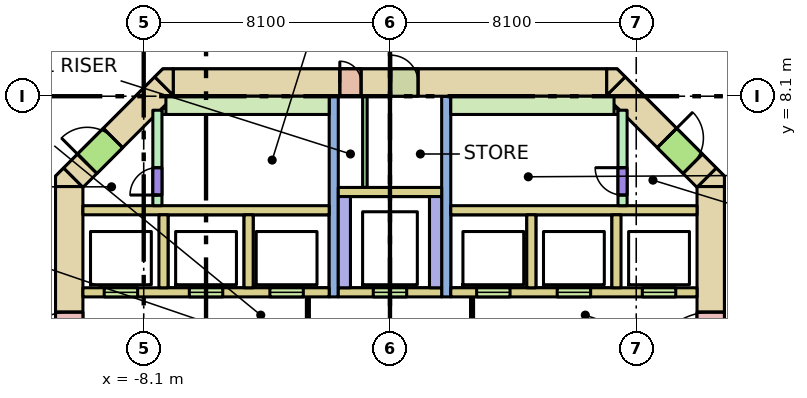
"""IFC4 building model, lengths in metres.
Left out: names, types, materials, properties, quantities, classifications, styles, units other than length and angle.
Written with IfcOpenShell. Run it as: python <this file> out.ifc"""

import sys

from ifc_helpers import new_model, si_unit, direction, frame, frame_2d, origin, place, context, subcontext, project, spatial, polyline, rectangle, outline, extrude, element, fill, save


model = new_model("IFC4")
c1 = context("Model", 3, precision=1e-05, world=origin(), true_north=direction((0.0, 1.0)))
c2 = subcontext(c1, "Body", "Model", "MODEL_VIEW")
j1 = project(units=[si_unit("LENGTHUNIT", "METRE"), si_unit("PLANEANGLEUNIT", "RADIAN")], contexts=[c1])
p1 = place(None, origin())
s1 = spatial("IfcSite", under=j1, at=p1, CompositionType="ELEMENT")
p2 = place(p1, origin())
s2 = spatial("IfcBuilding", under=s1, at=p2, CompositionType="ELEMENT")
p3 = place(p2, frame((0.0, 0.0, -3.6)))
s3 = spatial("IfcBuildingStorey", under=s2, at=p3, CompositionType="ELEMENT", Elevation=-3.6)
p4 = place(p3, frame((-7.13, 8.55, -0.32), z_axis=(0.0, 0.0, 1.0), x_axis=(1.0, 0.0, 0.0)))
e1 = element("IfcWall", 1, at=p4, inside=s3, PredefinedType="SHEAR", context=c2, shape_type="SweptSolid", body=[
    extrude(rectangle(XDim=14.26, YDim=0.9, at=frame_2d((7.13, 0.0))), origin(), (0.0, 0.0, 1.0), 3.6),
])
p5 = place(p4, frame((5.48, 0.0, 0.32)))
e2 = element("IfcOpeningElement", 2, at=p5, cuts=e1, PredefinedType="OPENING", context=c2, shape_type="SweptSolid", body=[
    extrude(rectangle(XDim=0.7, YDim=2.1, at=frame_2d((0.35, 1.05))), frame((0.0, 0.46, 0.0), z_axis=(0.0, -1.0, 0.0), x_axis=(1.0, 0.0, 0.0)), (0.0, 0.0, 1.0), 0.92),
])
p6 = place(p4, frame((7.155, 0.0, 0.32)))
e3 = element("IfcOpeningElement", 3, at=p6, cuts=e1, PredefinedType="OPENING", context=c2, shape_type="SweptSolid", body=[
    extrude(rectangle(XDim=0.9, YDim=2.1, at=frame_2d((0.45, 1.05))), frame((0.0, 0.46, 0.0), z_axis=(0.0, -1.0, 0.0), x_axis=(1.0, 0.0, 0.0)), (0.0, 0.0, 1.0), 0.92),
])
p7 = place(p3, frame((-10.55, -5.13, -0.32), z_axis=(0.0, 0.0, 1.0), x_axis=(0.0, 1.0, 0.0)))
e4 = element("IfcWall", 4, at=p7, inside=s3, PredefinedType="SHEAR", context=c2, shape_type="SweptSolid", body=[
    extrude(rectangle(XDim=10.26, YDim=0.9, at=frame_2d((5.13, 0.0))), origin(), (0.0, 0.0, 1.0), 3.6),
])
p8 = place(p7, frame((4.13, 0.0, 0.32)))
e5 = element("IfcOpeningElement", 5, at=p8, cuts=e4, PredefinedType="OPENING", context=c2, shape_type="SweptSolid", body=[
    extrude(rectangle(XDim=2.0, YDim=2.1, at=frame_2d((1.0, 1.05))), frame((0.0, 0.46, 0.0), z_axis=(0.0, -1.0, 0.0), x_axis=(1.0, 0.0, 0.0)), (0.0, 0.0, 1.0), 0.92),
])
p9 = place(p3, frame((10.55, -5.13, -0.32), z_axis=(0.0, 0.0, 1.0), x_axis=(0.0, 1.0, 0.0)))
e6 = element("IfcWall", 6, at=p9, inside=s3, PredefinedType="SHEAR", context=c2, shape_type="SweptSolid", body=[
    extrude(rectangle(XDim=10.26, YDim=0.9, at=frame_2d((5.13, 0.0))), origin(), (0.0, 0.0, 1.0), 3.6),
])
p10 = place(p9, frame((4.13, 0.0, 0.32)))
e7 = element("IfcOpeningElement", 7, at=p10, cuts=e6, PredefinedType="OPENING", context=c2, shape_type="SweptSolid", body=[
    extrude(rectangle(XDim=2.0, YDim=2.1, at=frame_2d((1.0, 1.05))), frame((0.0, 0.46, 0.0), z_axis=(0.0, -1.0, 0.0), x_axis=(1.0, 0.0, 0.0)), (0.0, 0.0, 1.0), 0.92),
])
p11 = place(p3, frame((-10.418, 5.418, -0.32), z_axis=(0.0, 0.0, 1.0), x_axis=(0.707106781187, 0.707106781187, 0.0)))
e8 = element("IfcWall", 8, at=p11, inside=s3, PredefinedType="SHEAR", context=c2, shape_type="SweptSolid", body=[
    extrude(rectangle(XDim=4.243, YDim=0.9, at=frame_2d((2.121, 0.0))), origin(), (0.0, 0.0, 1.0), 3.6),
])
p12 = place(p11, frame((0.65, 0.0, 0.32)))
e9 = element("IfcOpeningElement", 9, at=p12, cuts=e8, PredefinedType="OPENING", context=c2, shape_type="SweptSolid", body=[
    extrude(rectangle(XDim=1.2, YDim=2.1, at=frame_2d((0.6, 1.05))), frame((0.0, 0.46, 0.0), z_axis=(0.0, -1.0, 0.0), x_axis=(1.0, 0.0, 0.0)), (0.0, 0.0, 1.0), 0.92),
])
p13 = place(p3, frame((7.418, 8.418, -0.32), z_axis=(0.0, 0.0, 1.0), x_axis=(0.707106781187, -0.707106781187, 0.0)))
e10 = element("IfcWall", 10, at=p13, inside=s3, PredefinedType="SHEAR", context=c2, shape_type="SweptSolid", body=[
    extrude(rectangle(XDim=4.243, YDim=0.9, at=frame_2d((2.121, 0.0))), origin(), (0.0, 0.0, 1.0), 3.6),
])
p14 = place(p13, frame((2.393, 0.0, 0.32)))
e11 = element("IfcOpeningElement", 11, at=p14, cuts=e10, PredefinedType="OPENING", context=c2, shape_type="SweptSolid", body=[
    extrude(rectangle(XDim=1.2, YDim=2.1, at=frame_2d((0.6, 1.05))), frame((0.0, 0.46, 0.0), z_axis=(0.0, -1.0, 0.0), x_axis=(1.0, 0.0, 0.0)), (0.0, 0.0, 1.0), 0.92),
])
p15 = place(p3, frame((0.0, 0.0, -0.32)))
e12 = element("IfcWall", 12, at=p15, inside=s3, PredefinedType="SHEAR", context=c2, shape_type="SweptSolid", body=[
    extrude(outline(polyline([(-10.736, 5.736), (-10.13, 5.13), (-11.0, 5.13), (-11.0, 5.473), (-10.736, 5.736)])), origin(), (0.0, 0.0, 1.0), 3.6),
])
p16 = place(p3, frame((0.0, 0.0, -0.32)))
e13 = element("IfcWall", 13, at=p16, inside=s3, PredefinedType="SHEAR", context=c2, shape_type="SweptSolid", body=[
    extrude(outline(polyline([(11.0, 5.473), (11.0, 5.13), (10.13, 5.13), (10.736, 5.736), (11.0, 5.473)])), origin(), (0.0, 0.0, 1.0), 3.6),
])
p17 = place(p3, frame((0.0, 0.0, -0.32)))
e14 = element("IfcWall", 14, at=p17, inside=s3, PredefinedType="SHEAR", context=c2, shape_type="SweptSolid", body=[
    extrude(outline(polyline([(-7.473, 9.0), (-7.13, 9.0), (-7.13, 8.13), (-7.736, 8.736), (-7.473, 9.0)])), origin(), (0.0, 0.0, 1.0), 3.6),
])
p18 = place(p3, frame((0.0, 0.0, -0.32)))
e15 = element("IfcWall", 15, at=p18, inside=s3, PredefinedType="SHEAR", context=c2, shape_type="SweptSolid", body=[
    extrude(outline(polyline([(7.473, 9.0), (7.736, 8.736), (7.13, 8.13), (7.13, 9.0), (7.473, 9.0)])), origin(), (0.0, 0.0, 1.0), 3.6),
])
for number, where, z_axis, x_axis in (
    (16, (-10.1, 4.35, 0.0), (0.0, 0.0, 1.0), (1.0, 0.0, 0.0)),
    (17, (2.0, 4.35, 0.0), (0.0, 0.0, 1.0), (1.0, 0.0, 0.0)),
):
    element("IfcWall", number, at=place(p3, frame(where, z_axis=z_axis, x_axis=x_axis)), inside=s3, PredefinedType="SOLIDWALL", context=c2, shape_type="SweptSolid", body=[
        extrude(rectangle(XDim=8.1, YDim=0.3, at=frame_2d((4.05, 0.0))), origin(), (0.0, 0.0, 1.0), 3.28),
    ])
p19 = place(p3, frame((-10.1, 1.65, 0.0), z_axis=(0.0, 0.0, 1.0), x_axis=(1.0, 0.0, 0.0)))
e18 = element("IfcWall", 18, at=p19, inside=s3, PredefinedType="SOLIDWALL", context=c2, shape_type="SweptSolid", body=[
    extrude(rectangle(XDim=8.1, YDim=0.3, at=frame_2d((4.05, 0.0))), origin(), (0.0, 0.0, 1.0), 3.28),
])
p20 = place(p19, frame((0.7, 0.0, 0.0)))
e19 = element("IfcOpeningElement", 19, at=p20, cuts=e18, PredefinedType="OPENING", context=c2, shape_type="SweptSolid", body=[
    extrude(rectangle(XDim=1.1, YDim=2.1, at=frame_2d((0.55, 1.05))), frame((0.0, 0.16, 0.0), z_axis=(0.0, -1.0, 0.0), x_axis=(1.0, 0.0, 0.0)), (0.0, 0.0, 1.0), 0.32),
])
p21 = place(p19, frame((3.5, 0.0, 0.0)))
e20 = element("IfcOpeningElement", 20, at=p21, cuts=e18, PredefinedType="OPENING", context=c2, shape_type="SweptSolid", body=[
    extrude(rectangle(XDim=1.1, YDim=2.1, at=frame_2d((0.55, 1.05))), frame((0.0, 0.16, 0.0), z_axis=(0.0, -1.0, 0.0), x_axis=(1.0, 0.0, 0.0)), (0.0, 0.0, 1.0), 0.32),
])
p22 = place(p19, frame((6.15, 0.0, 0.0)))
e21 = element("IfcOpeningElement", 21, at=p22, cuts=e18, PredefinedType="OPENING", context=c2, shape_type="SweptSolid", body=[
    extrude(rectangle(XDim=1.1, YDim=2.1, at=frame_2d((0.55, 1.05))), frame((0.0, 0.16, 0.0), z_axis=(0.0, -1.0, 0.0), x_axis=(1.0, 0.0, 0.0)), (0.0, 0.0, 1.0), 0.32),
])
p23 = place(p3, frame((2.0, 1.65, 0.0), z_axis=(0.0, 0.0, 1.0), x_axis=(1.0, 0.0, 0.0)))
e22 = element("IfcWall", 22, at=p23, inside=s3, PredefinedType="SOLIDWALL", context=c2, shape_type="SweptSolid", body=[
    extrude(rectangle(XDim=8.1, YDim=0.3, at=frame_2d((4.05, 0.0))), origin(), (0.0, 0.0, 1.0), 3.28),
])
p24 = place(p23, frame((0.85, 0.0, 0.0)))
e23 = element("IfcOpeningElement", 23, at=p24, cuts=e22, PredefinedType="OPENING", context=c2, shape_type="SweptSolid", body=[
    extrude(rectangle(XDim=1.1, YDim=2.1, at=frame_2d((0.55, 1.05))), frame((0.0, 0.16, 0.0), z_axis=(0.0, -1.0, 0.0), x_axis=(1.0, 0.0, 0.0)), (0.0, 0.0, 1.0), 0.32),
])
p25 = place(p23, frame((3.5, 0.0, 0.0)))
e24 = element("IfcOpeningElement", 24, at=p25, cuts=e22, PredefinedType="OPENING", context=c2, shape_type="SweptSolid", body=[
    extrude(rectangle(XDim=1.1, YDim=2.1, at=frame_2d((0.55, 1.05))), frame((0.0, 0.16, 0.0), z_axis=(0.0, -1.0, 0.0), x_axis=(1.0, 0.0, 0.0)), (0.0, 0.0, 1.0), 0.32),
])
p26 = place(p23, frame((6.3, 0.0, 0.0)))
e25 = element("IfcOpeningElement", 25, at=p26, cuts=e22, PredefinedType="OPENING", context=c2, shape_type="SweptSolid", body=[
    extrude(rectangle(XDim=1.1, YDim=2.1, at=frame_2d((0.55, 1.05))), frame((0.0, 0.16, 0.0), z_axis=(0.0, -1.0, 0.0), x_axis=(1.0, 0.0, 0.0)), (0.0, 0.0, 1.0), 0.32),
])
for number, where, z_axis, x_axis in (
    (26, (-7.45, 1.8, 0.0), (0.0, 0.0, 1.0), (0.0, 1.0, 0.0)),
    (27, (-4.65, 1.8, 0.0), (0.0, 0.0, 1.0), (0.0, 1.0, 0.0)),
    (28, (4.65, 1.8, 0.0), (0.0, 0.0, 1.0), (0.0, 1.0, 0.0)),
    (29, (7.45, 1.8, 0.0), (0.0, 0.0, 1.0), (0.0, 1.0, 0.0)),
):
    element("IfcWall", number, at=place(p3, frame(where, z_axis=z_axis, x_axis=x_axis)), inside=s3, PredefinedType="SOLIDWALL", context=c2, shape_type="SweptSolid", body=[
        extrude(rectangle(XDim=2.4, YDim=0.3, at=frame_2d((1.2, 0.0))), origin(), (0.0, 0.0, 1.0), 3.28),
    ])
for number, where, z_axis, x_axis in (
    (30, (-1.85, 1.5, 0.0), (0.0, 0.0, 1.0), (0.0, 1.0, 0.0)),
    (31, (1.85, 1.5, 0.0), (0.0, 0.0, 1.0), (0.0, 1.0, 0.0)),
):
    element("IfcWall", number, at=place(p3, frame(where, z_axis=z_axis, x_axis=x_axis)), inside=s3, PredefinedType="SHEAR", context=c2, shape_type="SweptSolid", body=[
        extrude(rectangle(XDim=6.6, YDim=0.3, at=frame_2d((3.3, 0.0))), origin(), (0.0, 0.0, 1.0), 3.28),
    ])
p27 = place(p3, frame((-1.7, 1.65, 0.0), z_axis=(0.0, 0.0, 1.0), x_axis=(1.0, 0.0, 0.0)))
e32 = element("IfcWall", 32, at=p27, inside=s3, PredefinedType="SOLIDWALL", context=c2, shape_type="SweptSolid", body=[
    extrude(rectangle(XDim=3.4, YDim=0.3, at=frame_2d((1.7, 0.0))), origin(), (0.0, 0.0, 1.0), 3.28),
])
p28 = place(p27, frame((1.15, 0.0, 0.0)))
e33 = element("IfcOpeningElement", 33, at=p28, cuts=e32, PredefinedType="OPENING", context=c2, shape_type="SweptSolid", body=[
    extrude(rectangle(XDim=1.1, YDim=2.1, at=frame_2d((0.55, 1.05))), frame((0.0, 0.16, 0.0), z_axis=(0.0, -1.0, 0.0), x_axis=(1.0, 0.0, 0.0)), (0.0, 0.0, 1.0), 0.32),
])
for number, where, z_axis, x_axis in (
    (34, (-1.5, 1.8, 0.0), (0.0, 0.0, 1.0), (0.0, 1.0, 0.0)),
    (35, (1.5, 1.8, 0.0), (0.0, 0.0, 1.0), (0.0, 1.0, 0.0)),
):
    element("IfcWall", number, at=place(p3, frame(where, z_axis=z_axis, x_axis=x_axis)), inside=s3, PredefinedType="SOLIDWALL", context=c2, shape_type="SweptSolid", body=[
        extrude(rectangle(XDim=3.0, YDim=0.4, at=frame_2d((1.5, 0.0))), origin(), (0.0, 0.0, 1.0), 3.28),
    ])
p29 = place(p3, frame((-1.7, 4.95, 0.0), z_axis=(0.0, 0.0, 1.0), x_axis=(1.0, 0.0, 0.0)))
e36 = element("IfcWall", 36, at=p29, inside=s3, PredefinedType="SOLIDWALL", context=c2, shape_type="SweptSolid", body=[
    extrude(rectangle(XDim=3.4, YDim=0.3, at=frame_2d((1.7, 0.0))), origin(), (0.0, 0.0, 1.0), 3.28),
])
p30 = place(p3, frame((-7.65, 4.5, 0.0), z_axis=(0.0, 0.0, 1.0), x_axis=(0.0, 1.0, 0.0)))
e37 = element("IfcWall", 37, at=p30, inside=s3, PredefinedType="SHEAR", context=c2, shape_type="SweptSolid", body=[
    extrude(rectangle(XDim=3.14, YDim=0.3, at=frame_2d((1.57, 0.0))), origin(), (0.0, 0.0, 1.0), 3.28),
])
p31 = place(p30, frame((0.35, 0.0, 0.0)))
e38 = element("IfcOpeningElement", 38, at=p31, cuts=e37, PredefinedType="OPENING", context=c2, shape_type="SweptSolid", body=[
    extrude(rectangle(XDim=0.9, YDim=2.1, at=frame_2d((0.45, 1.05))), frame((0.0, 0.16, 0.0), z_axis=(0.0, -1.0, 0.0), x_axis=(1.0, 0.0, 0.0)), (0.0, 0.0, 1.0), 0.32),
])
p32 = place(p3, frame((-7.37, 7.8, 0.0), z_axis=(0.0, 0.0, 1.0), x_axis=(1.0, 0.0, 0.0)))
e39 = element("IfcWall", 39, at=p32, inside=s3, PredefinedType="SHEAR", context=c2, shape_type="SweptSolid", body=[
    extrude(rectangle(XDim=5.37, YDim=0.6, at=frame_2d((2.685, 0.0))), origin(), (0.0, 0.0, 1.0), 3.28),
])
p33 = place(p3, frame((7.65, 4.5, 0.0), z_axis=(0.0, 0.0, 1.0), x_axis=(0.0, 1.0, 0.0)))
e40 = element("IfcWall", 40, at=p33, inside=s3, PredefinedType="SHEAR", context=c2, shape_type="SweptSolid", body=[
    extrude(rectangle(XDim=3.14, YDim=0.3, at=frame_2d((1.57, 0.0))), origin(), (0.0, 0.0, 1.0), 3.28),
])
p34 = place(p33, frame((0.35, 0.0, 0.0)))
e41 = element("IfcOpeningElement", 41, at=p34, cuts=e40, PredefinedType="OPENING", context=c2, shape_type="SweptSolid", body=[
    extrude(rectangle(XDim=0.9, YDim=2.1, at=frame_2d((0.45, 1.05))), frame((0.0, 0.16, 0.0), z_axis=(0.0, -1.0, 0.0), x_axis=(1.0, 0.0, 0.0)), (0.0, 0.0, 1.0), 0.32),
])
p35 = place(p3, frame((2.0, 7.8, 0.0), z_axis=(0.0, 0.0, 1.0), x_axis=(1.0, 0.0, 0.0)))
e42 = element("IfcWall", 42, at=p35, inside=s3, PredefinedType="SHEAR", context=c2, shape_type="SweptSolid", body=[
    extrude(rectangle(XDim=5.37, YDim=0.6, at=frame_2d((2.685, 0.0))), origin(), (0.0, 0.0, 1.0), 3.28),
])
for number, where, z_axis, x_axis in (
    (43, (-7.5, 7.6, 0.0), (0.0, 0.0, 1.0), (1.0, 0.0, 0.0)),
    (44, (6.9, 7.6, 0.0), (0.0, 0.0, 1.0), (1.0, 0.0, 0.0)),
):
    element("IfcWall", number, at=place(p3, frame(where, z_axis=z_axis, x_axis=x_axis)), inside=s3, PredefinedType="SHEAR", context=c2, shape_type="SweptSolid", body=[
        extrude(rectangle(XDim=0.6, YDim=0.2, at=frame_2d((0.3, 0.0))), origin(), (0.0, 0.0, 1.0), 3.28),
    ])
p36 = place(p3, frame((-2.7, -1.5, 0.0), z_axis=(0.0, 0.0, 1.0), x_axis=(0.0, 1.0, 0.0)))
e45 = element("IfcWall", 45, at=p36, inside=s3, PredefinedType="PARTITIONING", context=c2, shape_type="SweptSolid", body=[
    extrude(rectangle(XDim=3.0, YDim=0.1, at=frame_2d((1.5, 0.0))), origin(), (0.0, 0.0, 1.0), 3.28),
])
p37 = place(p36, frame((0.9, 0.0, 0.0)))
e46 = element("IfcOpeningElement", 46, at=p37, cuts=e45, PredefinedType="OPENING", context=c2, shape_type="SweptSolid", body=[
    extrude(rectangle(XDim=1.2, YDim=2.1, at=frame_2d((0.6, 1.05))), frame((0.0, 0.06, 0.0), z_axis=(0.0, -1.0, 0.0), x_axis=(1.0, 0.0, 0.0)), (0.0, 0.0, 1.0), 0.12),
])
p38 = place(p3, frame((2.7, -1.5, 0.0), z_axis=(0.0, 0.0, 1.0), x_axis=(0.0, 1.0, 0.0)))
e47 = element("IfcWall", 47, at=p38, inside=s3, PredefinedType="PARTITIONING", context=c2, shape_type="SweptSolid", body=[
    extrude(rectangle(XDim=3.0, YDim=0.1, at=frame_2d((1.5, 0.0))), origin(), (0.0, 0.0, 1.0), 3.28),
])
p39 = place(p38, frame((0.9, 0.0, 0.0)))
e48 = element("IfcOpeningElement", 48, at=p39, cuts=e47, PredefinedType="OPENING", context=c2, shape_type="SweptSolid", body=[
    extrude(rectangle(XDim=1.2, YDim=2.1, at=frame_2d((0.6, 1.05))), frame((0.0, 0.06, 0.0), z_axis=(0.0, -1.0, 0.0), x_axis=(1.0, 0.0, 0.0)), (0.0, 0.0, 1.0), 0.12),
])
p40 = place(p3, frame((-0.825, 5.1, 0.0), z_axis=(0.0, 0.0, 1.0), x_axis=(0.0, 1.0, 0.0)))
e49 = element("IfcWall", 49, at=p40, inside=s3, PredefinedType="PARTITIONING", context=c2, shape_type="SweptSolid", body=[
    extrude(rectangle(XDim=3.0, YDim=0.15, at=frame_2d((1.5, 0.0))), origin(), (0.0, 0.0, 1.0), 3.28),
])
p41 = place(p20, origin())
e50 = element("IfcDoor", 50, at=p41, inside=s3, OperationType="DOUBLE_DOOR_SLIDING", PredefinedType="DOOR", context=c2, shape_type="SweptSolid", body=[
    extrude(rectangle(XDim=1.1, YDim=2.1, at=frame_2d((0.55, 1.05))), frame((0.0, 0.025, 0.0), z_axis=(0.0, -1.0, 0.0), x_axis=(1.0, 0.0, 0.0)), (0.0, 0.0, 1.0), 0.05),
])
fill(e19, e50)
p42 = place(p21, origin())
e51 = element("IfcDoor", 51, at=p42, inside=s3, OperationType="DOUBLE_DOOR_SLIDING", PredefinedType="DOOR", context=c2, shape_type="SweptSolid", body=[
    extrude(rectangle(XDim=1.1, YDim=2.1, at=frame_2d((0.55, 1.05))), frame((0.0, 0.025, 0.0), z_axis=(0.0, -1.0, 0.0), x_axis=(1.0, 0.0, 0.0)), (0.0, 0.0, 1.0), 0.05),
])
fill(e20, e51)
p43 = place(p22, origin())
e52 = element("IfcDoor", 52, at=p43, inside=s3, OperationType="DOUBLE_DOOR_SLIDING", PredefinedType="DOOR", context=c2, shape_type="SweptSolid", body=[
    extrude(rectangle(XDim=1.1, YDim=2.1, at=frame_2d((0.55, 1.05))), frame((0.0, 0.025, 0.0), z_axis=(0.0, -1.0, 0.0), x_axis=(1.0, 0.0, 0.0)), (0.0, 0.0, 1.0), 0.05),
])
fill(e21, e52)
p44 = place(p24, origin())
e53 = element("IfcDoor", 53, at=p44, inside=s3, OperationType="DOUBLE_DOOR_SLIDING", PredefinedType="DOOR", context=c2, shape_type="SweptSolid", body=[
    extrude(rectangle(XDim=1.1, YDim=2.1, at=frame_2d((0.55, 1.05))), frame((0.0, 0.025, 0.0), z_axis=(0.0, -1.0, 0.0), x_axis=(1.0, 0.0, 0.0)), (0.0, 0.0, 1.0), 0.05),
])
fill(e23, e53)
p45 = place(p25, origin())
e54 = element("IfcDoor", 54, at=p45, inside=s3, OperationType="DOUBLE_DOOR_SLIDING", PredefinedType="DOOR", context=c2, shape_type="SweptSolid", body=[
    extrude(rectangle(XDim=1.1, YDim=2.1, at=frame_2d((0.55, 1.05))), frame((0.0, 0.025, 0.0), z_axis=(0.0, -1.0, 0.0), x_axis=(1.0, 0.0, 0.0)), (0.0, 0.0, 1.0), 0.05),
])
fill(e24, e54)
p46 = place(p26, origin())
e55 = element("IfcDoor", 55, at=p46, inside=s3, OperationType="DOUBLE_DOOR_SLIDING", PredefinedType="DOOR", context=c2, shape_type="SweptSolid", body=[
    extrude(rectangle(XDim=1.1, YDim=2.1, at=frame_2d((0.55, 1.05))), frame((0.0, 0.025, 0.0), z_axis=(0.0, -1.0, 0.0), x_axis=(1.0, 0.0, 0.0)), (0.0, 0.0, 1.0), 0.05),
])
fill(e25, e55)
p47 = place(p28, origin())
e56 = element("IfcDoor", 56, at=p47, inside=s3, OperationType="DOUBLE_DOOR_SLIDING", PredefinedType="DOOR", context=c2, shape_type="SweptSolid", body=[
    extrude(rectangle(XDim=1.1, YDim=2.1, at=frame_2d((0.55, 1.05))), frame((0.0, 0.025, 0.0), z_axis=(0.0, -1.0, 0.0), x_axis=(1.0, 0.0, 0.0)), (0.0, 0.0, 1.0), 0.05),
])
fill(e33, e56)
p48 = place(p31, origin())
e57 = element("IfcDoor", 57, at=p48, inside=s3, OperationType="SINGLE_SWING_LEFT", PredefinedType="DOOR", context=c2, shape_type="SweptSolid", body=[
    extrude(rectangle(XDim=0.9, YDim=2.1, at=frame_2d((0.45, 1.05))), frame((0.0, 0.025, 0.0), z_axis=(0.0, -1.0, 0.0), x_axis=(1.0, 0.0, 0.0)), (0.0, 0.0, 1.0), 0.05),
])
fill(e38, e57)
p49 = place(p12, origin())
e58 = element("IfcDoor", 58, at=p49, inside=s3, OperationType="SINGLE_SWING_LEFT", PredefinedType="DOOR", context=c2, shape_type="SweptSolid", body=[
    extrude(rectangle(XDim=1.2, YDim=2.1, at=frame_2d((0.6, 1.05))), frame((0.0, 0.025, 0.0), z_axis=(0.0, -1.0, 0.0), x_axis=(1.0, 0.0, 0.0)), (0.0, 0.0, 1.0), 0.05),
])
fill(e9, e58)
p50 = place(p34, origin())
e59 = element("IfcDoor", 59, at=p50, inside=s3, OperationType="SINGLE_SWING_RIGHT", PredefinedType="DOOR", context=c2, shape_type="SweptSolid", body=[
    extrude(rectangle(XDim=0.9, YDim=2.1, at=frame_2d((0.45, 1.05))), frame((0.0, 0.025, 0.0), z_axis=(0.0, -1.0, 0.0), x_axis=(1.0, 0.0, 0.0)), (0.0, 0.0, 1.0), 0.05),
])
fill(e41, e59)
p51 = place(p14, origin())
e60 = element("IfcDoor", 60, at=p51, inside=s3, OperationType="SINGLE_SWING_LEFT", PredefinedType="DOOR", context=c2, shape_type="SweptSolid", body=[
    extrude(rectangle(XDim=1.2, YDim=2.1, at=frame_2d((0.6, 1.05))), frame((0.0, 0.025, 0.0), z_axis=(0.0, -1.0, 0.0), x_axis=(1.0, 0.0, 0.0)), (0.0, 0.0, 1.0), 0.05),
])
fill(e11, e60)
p52 = place(p8, origin())
e61 = element("IfcDoor", 61, at=p52, inside=s3, OperationType="DOUBLE_DOOR_SINGLE_SWING", PredefinedType="DOOR", context=c2, shape_type="SweptSolid", body=[
    extrude(rectangle(XDim=2.0, YDim=2.1, at=frame_2d((1.0, 1.05))), frame((0.0, 0.025, 0.0), z_axis=(0.0, -1.0, 0.0), x_axis=(1.0, 0.0, 0.0)), (0.0, 0.0, 1.0), 0.05),
])
fill(e5, e61)
p53 = place(p10, origin())
e62 = element("IfcDoor", 62, at=p53, inside=s3, OperationType="DOUBLE_DOOR_SINGLE_SWING", PredefinedType="DOOR", context=c2, shape_type="SweptSolid", body=[
    extrude(rectangle(XDim=2.0, YDim=2.1, at=frame_2d((1.0, 1.05))), frame((0.0, 0.025, 0.0), z_axis=(0.0, -1.0, 0.0), x_axis=(1.0, 0.0, 0.0)), (0.0, 0.0, 1.0), 0.05),
])
fill(e7, e62)
p54 = place(p5, origin())
e63 = element("IfcDoor", 63, at=p54, inside=s3, OperationType="SINGLE_SWING_LEFT", PredefinedType="DOOR", context=c2, shape_type="SweptSolid", body=[
    extrude(rectangle(XDim=0.7, YDim=2.1, at=frame_2d((0.35, 1.05))), frame((0.0, 0.025, 0.0), z_axis=(0.0, -1.0, 0.0), x_axis=(1.0, 0.0, 0.0)), (0.0, 0.0, 1.0), 0.05),
])
fill(e2, e63)
p55 = place(p6, origin())
e64 = element("IfcDoor", 64, at=p55, inside=s3, OperationType="SINGLE_SWING_LEFT", PredefinedType="DOOR", context=c2, shape_type="SweptSolid", body=[
    extrude(rectangle(XDim=0.9, YDim=2.1, at=frame_2d((0.45, 1.05))), frame((0.0, 0.025, 0.0), z_axis=(0.0, -1.0, 0.0), x_axis=(1.0, 0.0, 0.0)), (0.0, 0.0, 1.0), 0.05),
])
fill(e3, e64)
save(model, sys.argv[1])
